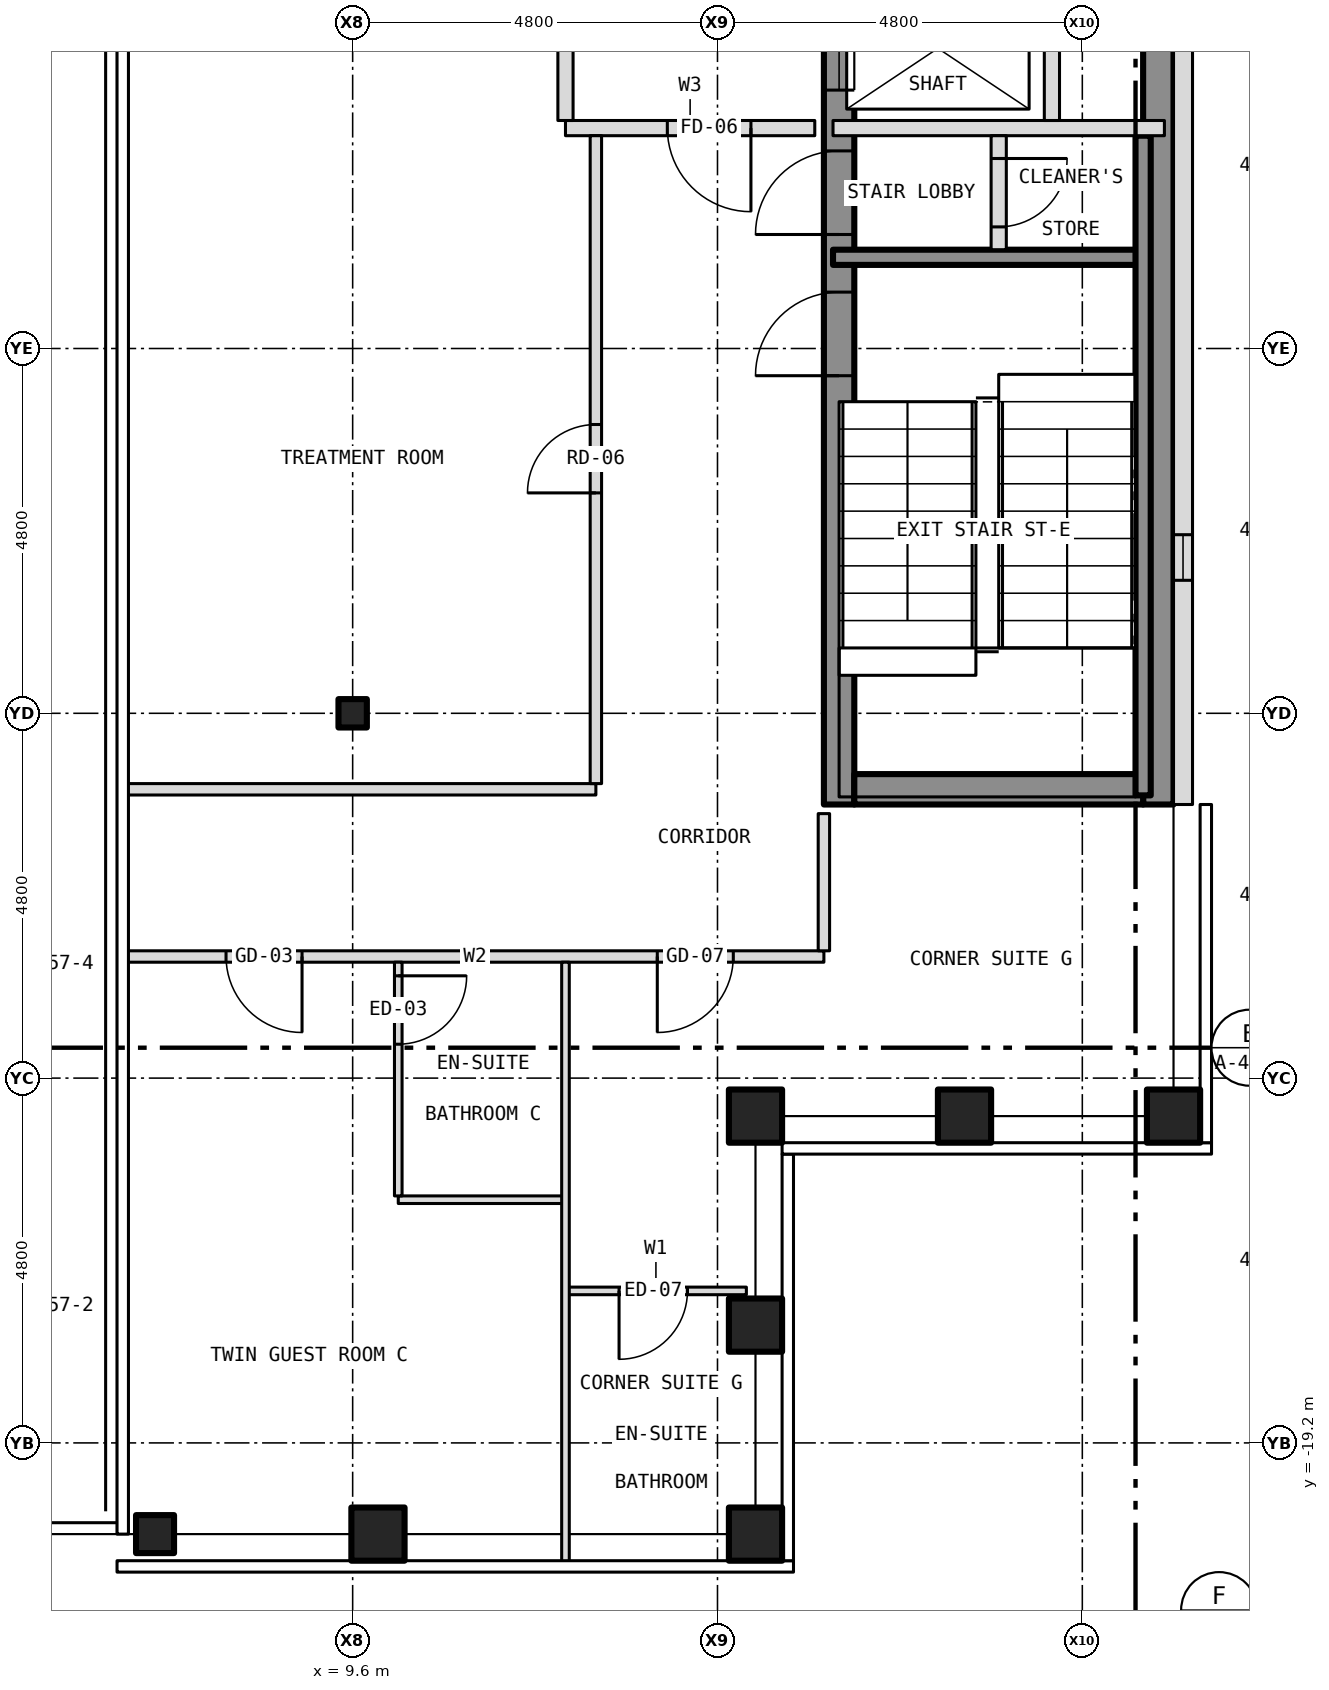
"""IFC4 building model, lengths in metres.
Left out: names, types, materials, properties, quantities, classifications, styles, units other than length and angle.
Written with IfcOpenShell. Run it as: python <this file> out.ifc"""

import sys

from ifc_helpers import new_model, si_unit, direction, frame, frame_2d, origin, origin_2d, place, context, subcontext, project, spatial, rectangle, hollow_rectangle, i_section, extrude, element, fill, save


model = new_model("IFC4")
c1 = context("Model", 3, precision=1e-05, world=origin(), true_north=direction((0.0, 1.0)))
c2 = subcontext(c1, "Body", "Model", "MODEL_VIEW")
j1 = project(units=[si_unit("LENGTHUNIT", "METRE"), si_unit("PLANEANGLEUNIT", "RADIAN")], contexts=[c1])
p1 = place(None, origin())
s1 = spatial("IfcSite", under=j1, at=p1, CompositionType="ELEMENT")
p2 = place(p1, origin())
s2 = spatial("IfcBuilding", under=s1, at=p2, CompositionType="ELEMENT")
p3 = place(p2, frame((0.0, 0.0, 219.0)))
s3 = spatial("IfcBuildingStorey", under=s2, at=p3, CompositionType="ELEMENT", Elevation=219.0)
for number, where, z_axis, x_axis in (
    (1, (9.933, -20.4, -0.15), (0.0, 0.0, 1.0), (1.0, 0.0, 0.0)),
    (2, (14.9, -20.4, -0.15), (0.0, 0.0, 1.0), (1.0, 0.0, 0.0)),
    (3, (20.4, -14.9, -0.15), (0.0, 0.0, 1.0), (1.0, 0.0, 0.0)),
    (4, (14.9, -14.9, -0.15), (0.0, 0.0, 1.0), (1.0, 0.0, 0.0)),
    (5, (14.9, -17.65, -0.15), (0.0, 0.0, 1.0), (1.0, 0.0, 0.0)),
    (6, (17.65, -14.9, -0.15), (0.0, 0.0, 1.0), (1.0, 0.0, 0.0)),
):
    element("IfcColumn", number, at=place(p3, frame(where, z_axis=z_axis, x_axis=x_axis)), inside=s3, PredefinedType="COLUMN", context=c2, shape_type="SweptSolid", body=[
        extrude(hollow_rectangle(XDim=0.7, YDim=0.7, WallThickness=0.04, at=origin_2d()), origin(), (0.0, 0.0, 1.0), 3.5),
    ])
p4 = place(p3, frame((7.0, -20.4, -0.15), z_axis=(0.0, 0.0, 1.0), x_axis=(1.0, 0.0, 0.0)))
e7 = element("IfcColumn", 7, at=p4, inside=s3, PredefinedType="COLUMN", context=c2, shape_type="SweptSolid", body=[
    extrude(hollow_rectangle(XDim=0.5, YDim=0.5, WallThickness=0.03, at=origin_2d()), origin(), (0.0, 0.0, 1.0), 3.5),
])
p5 = place(p3, frame((9.6, -9.6, -0.15), z_axis=(0.0, 0.0, 1.0), x_axis=(1.0, 0.0, 0.0)))
e8 = element("IfcColumn", 8, at=p5, inside=s3, PredefinedType="COLUMN", context=c2, shape_type="SweptSolid", body=[
    extrude(i_section(OverallWidth=0.373, OverallDepth=0.373, WebThickness=0.016, FlangeThickness=0.026, at=origin_2d()), origin(), (0.0, 0.0, 1.0), 3.5),
])
p6 = place(p3, frame((16.0, -10.8, 0.0), z_axis=(0.0, 0.0, 1.0), x_axis=(0.0, 1.0, 0.0)))
e9 = element("IfcWall", 9, at=p6, inside=s3, PredefinedType="SHEAR", context=c2, shape_type="SweptSolid", body=[
    extrude(rectangle(XDim=21.6, YDim=0.4, at=frame_2d((10.8, 0.0))), origin(), (0.0, 0.0, 1.0), 3.25),
])
p7 = place(p6, frame((9.4, 0.0, 0.0)))
e10 = element("IfcOpeningElement", 10, at=p7, cuts=e9, PredefinedType="OPENING", context=c2, shape_type="SweptSolid", body=[
    extrude(rectangle(XDim=1.1, YDim=2.1, at=frame_2d((0.55, 1.05))), frame((0.0, 0.212, 0.0), z_axis=(0.0, -1.0, 0.0), x_axis=(1.0, 0.0, 0.0)), (0.0, 0.0, 1.0), 0.424),
])
p8 = place(p6, frame((11.5, 0.0, 0.0)))
e11 = element("IfcOpeningElement", 11, at=p8, cuts=e9, PredefinedType="OPENING", context=c2, shape_type="SweptSolid", body=[
    extrude(rectangle(XDim=1.1, YDim=2.1, at=frame_2d((0.55, 1.05))), frame((0.0, 0.212, 0.0), z_axis=(0.0, -1.0, 0.0), x_axis=(1.0, 0.0, 0.0)), (0.0, 0.0, 1.0), 0.424),
])
p9 = place(p6, frame((13.6, 0.0, 0.0)))
e12 = element("IfcOpeningElement", 12, at=p9, cuts=e9, PredefinedType="OPENING", context=c2, shape_type="SweptSolid", body=[
    extrude(rectangle(XDim=1.1, YDim=2.1, at=frame_2d((0.55, 1.05))), frame((0.0, 0.212, 0.0), z_axis=(0.0, -1.0, 0.0), x_axis=(1.0, 0.0, 0.0)), (0.0, 0.0, 1.0), 0.424),
])
p10 = place(p6, frame((15.7, 0.0, 0.0)))
e13 = element("IfcOpeningElement", 13, at=p10, cuts=e9, PredefinedType="OPENING", context=c2, shape_type="SweptSolid", body=[
    extrude(rectangle(XDim=1.1, YDim=2.1, at=frame_2d((0.55, 1.05))), frame((0.0, 0.212, 0.0), z_axis=(0.0, -1.0, 0.0), x_axis=(1.0, 0.0, 0.0)), (0.0, 0.0, 1.0), 0.424),
])
p11 = place(p6, frame((17.8, 0.0, 0.0)))
e14 = element("IfcOpeningElement", 14, at=p11, cuts=e9, PredefinedType="OPENING", context=c2, shape_type="SweptSolid", body=[
    extrude(rectangle(XDim=1.1, YDim=2.1, at=frame_2d((0.55, 1.05))), frame((0.0, 0.212, 0.0), z_axis=(0.0, -1.0, 0.0), x_axis=(1.0, 0.0, 0.0)), (0.0, 0.0, 1.0), 0.424),
])
p12 = place(p6, frame((5.642, 0.0, 0.0)))
e15 = element("IfcOpeningElement", 15, at=p12, cuts=e9, PredefinedType="OPENING", context=c2, shape_type="SweptSolid", body=[
    extrude(rectangle(XDim=1.1, YDim=2.1, at=frame_2d((0.55, 1.05))), frame((0.0, 0.212, 0.0), z_axis=(0.0, -1.0, 0.0), x_axis=(1.0, 0.0, 0.0)), (0.0, 0.0, 1.0), 0.424),
])
p13 = place(p6, frame((7.5, 0.0, 0.0)))
e16 = element("IfcOpeningElement", 16, at=p13, cuts=e9, PredefinedType="OPENING", context=c2, shape_type="SweptSolid", body=[
    extrude(rectangle(XDim=1.1, YDim=2.1, at=frame_2d((0.55, 1.05))), frame((0.0, 0.212, 0.0), z_axis=(0.0, -1.0, 0.0), x_axis=(1.0, 0.0, 0.0)), (0.0, 0.0, 1.0), 0.424),
])
p14 = place(p6, frame((20.0, 0.0, 0.0)))
e17 = element("IfcOpeningElement", 17, at=p14, cuts=e9, PredefinedType="OPENING", context=c2, shape_type="SweptSolid", body=[
    extrude(rectangle(XDim=0.9, YDim=2.1, at=frame_2d((0.45, 1.05))), frame((0.0, 0.212, 0.0), z_axis=(0.0, -1.0, 0.0), x_axis=(1.0, 0.0, 0.0)), (0.0, 0.0, 1.0), 0.424),
])
p15 = place(p3, frame((20.2, -10.8, 0.0), z_axis=(0.0, 0.0, 1.0), x_axis=(0.0, 1.0, 0.0)))
e18 = element("IfcWall", 18, at=p15, inside=s3, PredefinedType="SHEAR", context=c2, shape_type="SweptSolid", body=[
    extrude(rectangle(XDim=21.6, YDim=0.4, at=frame_2d((10.8, 0.0))), origin(), (0.0, 0.0, 1.0), 3.25),
])
p16 = place(p3, frame((16.2, -10.6, 0.0), z_axis=(0.0, 0.0, 1.0), x_axis=(1.0, 0.0, 0.0)))
e19 = element("IfcWall", 19, at=p16, inside=s3, PredefinedType="SHEAR", context=c2, shape_type="SweptSolid", body=[
    extrude(rectangle(XDim=3.8, YDim=0.4, at=frame_2d((1.9, 0.0))), origin(), (0.0, 0.0, 1.0), 3.25),
])
p17 = place(p3, frame((20.525, -10.8, 0.0), z_axis=(0.0, 0.0, 1.0), x_axis=(0.0, 1.0, 0.0)))
e20 = element("IfcWall", 20, at=p17, inside=s3, PredefinedType="SOLIDWALL", context=c2, shape_type="SweptSolid", body=[
    extrude(rectangle(XDim=21.6, YDim=0.25, at=frame_2d((10.8, 0.0))), origin(), (0.0, 0.0, 1.0), 3.5),
])
p18 = place(p17, frame((2.95, 0.0, 1.0)))
e21 = element("IfcOpeningElement", 21, at=p18, cuts=e20, PredefinedType="OPENING", context=c2, shape_type="SweptSolid", body=[
    extrude(rectangle(XDim=0.6, YDim=1.5, at=frame_2d((0.3, 0.75))), frame((0.0, 0.137, 0.0), z_axis=(0.0, -1.0, 0.0), x_axis=(1.0, 0.0, 0.0)), (0.0, 0.0, 1.0), 0.274),
])
p19 = place(p3, frame((12.4, -17.2, 0.0), z_axis=(0.0, 0.0, 1.0), x_axis=(1.0, 0.0, 0.0)))
e22 = element("IfcWall", 22, at=p19, inside=s3, PredefinedType="PARTITIONING", context=c2, shape_type="SweptSolid", body=[
    extrude(rectangle(XDim=2.38, YDim=0.1, at=frame_2d((1.19, 0.0))), origin(), (0.0, 0.0, 1.0), 3.35),
])
p20 = place(p19, frame((0.705, 0.0, 0.0)))
e23 = element("IfcOpeningElement", 23, at=p20, cuts=e22, PredefinedType="OPENING", context=c2, shape_type="SweptSolid", body=[
    extrude(rectangle(XDim=0.9, YDim=2.1, at=frame_2d((0.45, 1.05))), frame((0.0, 0.062, 0.0), z_axis=(0.0, -1.0, 0.0), x_axis=(1.0, 0.0, 0.0)), (0.0, 0.0, 1.0), 0.124),
])
p21 = place(p3, frame((10.2, -16.0, 0.0), z_axis=(0.0, 0.0, 1.0), x_axis=(1.0, 0.0, 0.0)))
e24 = element("IfcWall", 24, at=p21, inside=s3, PredefinedType="PARTITIONING", context=c2, shape_type="SweptSolid", body=[
    extrude(rectangle(XDim=2.2, YDim=0.1, at=frame_2d((1.1, 0.0))), origin(), (0.0, 0.0, 1.0), 3.35),
])
p22 = place(p3, frame((6.62, -12.8, 0.0), z_axis=(0.0, 0.0, 1.0), x_axis=(1.0, 0.0, 0.0)))
e25 = element("IfcWall", 25, at=p22, inside=s3, PredefinedType="PARTITIONING", context=c2, shape_type="SweptSolid", body=[
    extrude(rectangle(XDim=9.18, YDim=0.15, at=frame_2d((4.59, 0.0))), origin(), (0.0, 0.0, 1.0), 3.35),
])
p23 = place(p22, frame((1.314, 0.0, 0.0)))
e26 = element("IfcOpeningElement", 26, at=p23, cuts=e25, PredefinedType="OPENING", context=c2, shape_type="SweptSolid", body=[
    extrude(rectangle(XDim=1.0, YDim=2.1, at=frame_2d((0.5, 1.05))), frame((0.0, 0.087, 0.0), z_axis=(0.0, -1.0, 0.0), x_axis=(1.0, 0.0, 0.0)), (0.0, 0.0, 1.0), 0.174),
])
p24 = place(p22, frame((6.988, 0.0, 0.0)))
e27 = element("IfcOpeningElement", 27, at=p24, cuts=e25, PredefinedType="OPENING", context=c2, shape_type="SweptSolid", body=[
    extrude(rectangle(XDim=1.0, YDim=2.1, at=frame_2d((0.5, 1.05))), frame((0.0, 0.087, 0.0), z_axis=(0.0, -1.0, 0.0), x_axis=(1.0, 0.0, 0.0)), (0.0, 0.0, 1.0), 0.174),
])
p25 = place(p3, frame((6.62, -10.6, 0.0), z_axis=(0.0, 0.0, 1.0), x_axis=(1.0, 0.0, 0.0)))
e28 = element("IfcWall", 28, at=p25, inside=s3, PredefinedType="PARTITIONING", context=c2, shape_type="SweptSolid", body=[
    extrude(rectangle(XDim=6.18, YDim=0.15, at=frame_2d((3.09, 0.0))), origin(), (0.0, 0.0, 1.0), 3.35),
])
p26 = place(p3, frame((15.92, -3.6, 0.0), z_axis=(0.0, 0.0, 1.0), x_axis=(1.0, 0.0, 0.0)))
e29 = element("IfcWall", 29, at=p26, inside=s3, PredefinedType="SHEAR", context=c2, shape_type="SweptSolid", body=[
    extrude(rectangle(XDim=4.08, YDim=0.2, at=frame_2d((2.04, 0.0))), origin(), (0.0, 0.0, 1.0), 3.25),
])
p27 = place(p3, frame((12.4, -1.9, 0.0), z_axis=(0.0, 0.0, 1.0), x_axis=(1.0, 0.0, 0.0)))
e30 = element("IfcWall", 30, at=p27, inside=s3, PredefinedType="PARTITIONING", context=c2, shape_type="SweptSolid", body=[
    extrude(rectangle(XDim=3.28, YDim=0.2, at=frame_2d((1.64, 0.0))), origin(), (0.0, 0.0, 1.0), 3.35),
])
p28 = place(p27, frame((1.34, 0.0, 0.0)))
e31 = element("IfcOpeningElement", 31, at=p28, cuts=e30, PredefinedType="OPENING", context=c2, shape_type="SweptSolid", body=[
    extrude(rectangle(XDim=1.1, YDim=2.1, at=frame_2d((0.55, 1.05))), frame((0.0, 0.112, 0.0), z_axis=(0.0, -1.0, 0.0), x_axis=(1.0, 0.0, 0.0)), (0.0, 0.0, 1.0), 0.224),
])
p29 = place(p3, frame((15.92, -1.9, 0.0), z_axis=(0.0, 0.0, 1.0), x_axis=(1.0, 0.0, 0.0)))
e32 = element("IfcWall", 32, at=p29, inside=s3, PredefinedType="PARTITIONING", context=c2, shape_type="SweptSolid", body=[
    extrude(rectangle(XDim=4.36, YDim=0.2, at=frame_2d((2.18, 0.0))), origin(), (0.0, 0.0, 1.0), 3.25),
])
p30 = place(p3, frame((10.2, -15.95, 0.0), z_axis=(0.0, 0.0, 1.0), x_axis=(0.0, 1.0, 0.0)))
e33 = element("IfcWall", 33, at=p30, inside=s3, PredefinedType="PARTITIONING", context=c2, shape_type="SweptSolid", body=[
    extrude(rectangle(XDim=3.075, YDim=0.1, at=frame_2d((1.538, 0.0))), origin(), (0.0, 0.0, 1.0), 3.35),
])
p31 = place(p30, frame((1.996, 0.0, 0.0)))
e34 = element("IfcOpeningElement", 34, at=p31, cuts=e33, PredefinedType="OPENING", context=c2, shape_type="SweptSolid", body=[
    extrude(rectangle(XDim=0.9, YDim=2.1, at=frame_2d((0.45, 1.05))), frame((0.0, 0.062, 0.0), z_axis=(0.0, -1.0, 0.0), x_axis=(1.0, 0.0, 0.0)), (0.0, 0.0, 1.0), 0.124),
])
p32 = place(p3, frame((12.4, -20.78, 0.0), z_axis=(0.0, 0.0, 1.0), x_axis=(0.0, 1.0, 0.0)))
e35 = element("IfcWall", 35, at=p32, inside=s3, PredefinedType="PARTITIONING", context=c2, shape_type="SweptSolid", body=[
    extrude(rectangle(XDim=7.905, YDim=0.1, at=frame_2d((3.953, 0.0))), origin(), (0.0, 0.0, 1.0), 3.35),
])
p33 = place(p3, frame((12.4, -1.8, 0.0), z_axis=(0.0, 0.0, 1.0), x_axis=(0.0, 1.0, 0.0)))
e36 = element("IfcWall", 36, at=p33, inside=s3, PredefinedType="PARTITIONING", context=c2, shape_type="SweptSolid", body=[
    extrude(rectangle(XDim=4.0, YDim=0.2, at=frame_2d((2.0, 0.0))), origin(), (0.0, 0.0, 1.0), 3.35),
])
p34 = place(p3, frame((12.8, -10.525, 0.0), z_axis=(0.0, 0.0, 1.0), x_axis=(0.0, 1.0, 0.0)))
e37 = element("IfcWall", 37, at=p34, inside=s3, PredefinedType="PARTITIONING", context=c2, shape_type="SweptSolid", body=[
    extrude(rectangle(XDim=8.525, YDim=0.15, at=frame_2d((4.262, 0.0))), origin(), (0.0, 0.0, 1.0), 3.35),
])
p35 = place(p34, frame((3.825, 0.0, 0.0)))
e38 = element("IfcOpeningElement", 38, at=p35, cuts=e37, PredefinedType="OPENING", context=c2, shape_type="SweptSolid", body=[
    extrude(rectangle(XDim=0.9, YDim=2.1, at=frame_2d((0.45, 1.05))), frame((0.0, 0.087, 0.0), z_axis=(0.0, -1.0, 0.0), x_axis=(1.0, 0.0, 0.0)), (0.0, 0.0, 1.0), 0.174),
])
p36 = place(p3, frame((15.8, -12.725, 0.0), z_axis=(0.0, 0.0, 1.0), x_axis=(0.0, 1.0, 0.0)))
e39 = element("IfcWall", 39, at=p36, inside=s3, PredefinedType="PARTITIONING", context=c2, shape_type="SweptSolid", body=[
    extrude(rectangle(XDim=1.805, YDim=0.15, at=frame_2d((0.903, 0.0))), origin(), (0.0, 0.0, 1.0), 3.35),
])
p37 = place(p3, frame((18.1, -3.5, 0.0), z_axis=(0.0, 0.0, 1.0), x_axis=(0.0, 1.0, 0.0)))
e40 = element("IfcWall", 40, at=p37, inside=s3, PredefinedType="PARTITIONING", context=c2, shape_type="SweptSolid", body=[
    extrude(rectangle(XDim=1.5, YDim=0.2, at=frame_2d((0.75, 0.0))), origin(), (0.0, 0.0, 1.0), 3.25),
])
p38 = place(p37, frame((0.3, 0.0, 0.0)))
e41 = element("IfcOpeningElement", 41, at=p38, cuts=e40, PredefinedType="OPENING", context=c2, shape_type="SweptSolid", body=[
    extrude(rectangle(XDim=0.9, YDim=2.1, at=frame_2d((0.45, 1.05))), frame((0.0, 0.112, 0.0), z_axis=(0.0, -1.0, 0.0), x_axis=(1.0, 0.0, 0.0)), (0.0, 0.0, 1.0), 0.224),
])
p39 = place(p3, frame((18.8, -1.8, 0.0), z_axis=(0.0, 0.0, 1.0), x_axis=(0.0, 1.0, 0.0)))
e42 = element("IfcWall", 42, at=p39, inside=s3, PredefinedType="PARTITIONING", context=c2, shape_type="SweptSolid", body=[
    extrude(rectangle(XDim=12.48, YDim=0.2, at=frame_2d((6.24, 0.0))), origin(), (0.0, 0.0, 1.0), 3.25),
])
p40 = place(p3, frame((20.0, -10.68, 0.0), z_axis=(0.0, 0.0, 1.0), x_axis=(0.0, 1.0, 0.0)))
e43 = element("IfcWall", 43, at=p40, inside=s3, PredefinedType="SHEAR", context=c2, shape_type="SweptSolid", body=[
    extrude(rectangle(XDim=8.68, YDim=0.2, at=frame_2d((4.34, 0.0))), origin(), (0.0, 0.0, 1.0), 3.25),
])
p41 = place(p18, origin())
e44 = element("IfcWindow", 44, at=p41, inside=s3, PartitioningType="SINGLE_PANEL", PredefinedType="WINDOW", context=c2, shape_type="SweptSolid", body=[
    extrude(rectangle(XDim=0.6, YDim=1.5, at=frame_2d((0.3, 0.75))), frame((0.0, -0.035, 0.0), z_axis=(0.0, -1.0, 0.0), x_axis=(1.0, 0.0, 0.0)), (0.0, 0.0, 1.0), 0.06),
])
fill(e21, e44)
p42 = place(p7, origin())
e45 = element("IfcDoor", 45, at=p42, inside=s3, OperationType="SLIDING_TO_LEFT", PredefinedType="DOOR", context=c2, shape_type="SweptSolid", body=[
    extrude(rectangle(XDim=1.1, YDim=2.1, at=frame_2d((0.55, 1.05))), frame((0.0, 0.025, 0.0), z_axis=(0.0, -1.0, 0.0), x_axis=(1.0, 0.0, 0.0)), (0.0, 0.0, 1.0), 0.05),
])
fill(e10, e45)
p43 = place(p12, origin())
e46 = element("IfcDoor", 46, at=p43, inside=s3, OperationType="SINGLE_SWING_LEFT", PredefinedType="DOOR", context=c2, shape_type="SweptSolid", body=[
    extrude(rectangle(XDim=1.1, YDim=2.1, at=frame_2d((0.55, 1.05))), frame((0.0, 0.025, 0.0), z_axis=(0.0, -1.0, 0.0), x_axis=(1.0, 0.0, 0.0)), (0.0, 0.0, 1.0), 0.05),
])
fill(e15, e46)
p44 = place(p38, origin())
e47 = element("IfcDoor", 47, at=p44, inside=s3, OperationType="SINGLE_SWING_RIGHT", PredefinedType="DOOR", context=c2, shape_type="SweptSolid", body=[
    extrude(rectangle(XDim=0.9, YDim=2.1, at=frame_2d((0.45, 1.05))), frame((0.0, 0.025, 0.0), z_axis=(0.0, -1.0, 0.0), x_axis=(1.0, 0.0, 0.0)), (0.0, 0.0, 1.0), 0.05),
])
fill(e41, e47)
p45 = place(p13, origin())
e48 = element("IfcDoor", 48, at=p45, inside=s3, OperationType="SINGLE_SWING_LEFT", PredefinedType="DOOR", context=c2, shape_type="SweptSolid", body=[
    extrude(rectangle(XDim=1.1, YDim=2.1, at=frame_2d((0.55, 1.05))), frame((0.0, 0.025, 0.0), z_axis=(0.0, -1.0, 0.0), x_axis=(1.0, 0.0, 0.0)), (0.0, 0.0, 1.0), 0.05),
])
fill(e16, e48)
p46 = place(p28, origin())
e49 = element("IfcDoor", 49, at=p46, inside=s3, OperationType="SINGLE_SWING_RIGHT", PredefinedType="DOOR", context=c2, shape_type="SweptSolid", body=[
    extrude(rectangle(XDim=1.1, YDim=2.1, at=frame_2d((0.55, 1.05))), frame((0.0, 0.025, 0.0), z_axis=(0.0, -1.0, 0.0), x_axis=(1.0, 0.0, 0.0)), (0.0, 0.0, 1.0), 0.05),
])
fill(e31, e49)
p47 = place(p23, origin())
e50 = element("IfcDoor", 50, at=p47, inside=s3, OperationType="SINGLE_SWING_RIGHT", PredefinedType="DOOR", context=c2, shape_type="SweptSolid", body=[
    extrude(rectangle(XDim=1.0, YDim=2.1, at=frame_2d((0.5, 1.05))), frame((0.0, 0.025, 0.0), z_axis=(0.0, -1.0, 0.0), x_axis=(1.0, 0.0, 0.0)), (0.0, 0.0, 1.0), 0.05),
])
fill(e26, e50)
p48 = place(p31, origin())
e51 = element("IfcDoor", 51, at=p48, inside=s3, OperationType="SINGLE_SWING_RIGHT", PredefinedType="DOOR", context=c2, shape_type="SweptSolid", body=[
    extrude(rectangle(XDim=0.9, YDim=2.1, at=frame_2d((0.45, 1.05))), frame((0.0, 0.025, 0.0), z_axis=(0.0, -1.0, 0.0), x_axis=(1.0, 0.0, 0.0)), (0.0, 0.0, 1.0), 0.05),
])
fill(e34, e51)
p49 = place(p20, origin())
e52 = element("IfcDoor", 52, at=p49, inside=s3, OperationType="SINGLE_SWING_LEFT", PredefinedType="DOOR", context=c2, shape_type="SweptSolid", body=[
    extrude(rectangle(XDim=0.9, YDim=2.1, at=frame_2d((0.45, 1.05))), frame((0.0, 0.025, 0.0), z_axis=(0.0, -1.0, 0.0), x_axis=(1.0, 0.0, 0.0)), (0.0, 0.0, 1.0), 0.05),
])
fill(e23, e52)
p50 = place(p24, origin())
e53 = element("IfcDoor", 53, at=p50, inside=s3, OperationType="SINGLE_SWING_LEFT", PredefinedType="DOOR", context=c2, shape_type="SweptSolid", body=[
    extrude(rectangle(XDim=1.0, YDim=2.1, at=frame_2d((0.5, 1.05))), frame((0.0, 0.025, 0.0), z_axis=(0.0, -1.0, 0.0), x_axis=(1.0, 0.0, 0.0)), (0.0, 0.0, 1.0), 0.05),
])
fill(e27, e53)
p51 = place(p35, origin())
e54 = element("IfcDoor", 54, at=p51, inside=s3, OperationType="SINGLE_SWING_LEFT", PredefinedType="DOOR", context=c2, shape_type="SweptSolid", body=[
    extrude(rectangle(XDim=0.9, YDim=2.1, at=frame_2d((0.45, 1.05))), frame((0.0, 0.025, 0.0), z_axis=(0.0, -1.0, 0.0), x_axis=(1.0, 0.0, 0.0)), (0.0, 0.0, 1.0), 0.05),
])
fill(e38, e54)
save(model, sys.argv[1])
